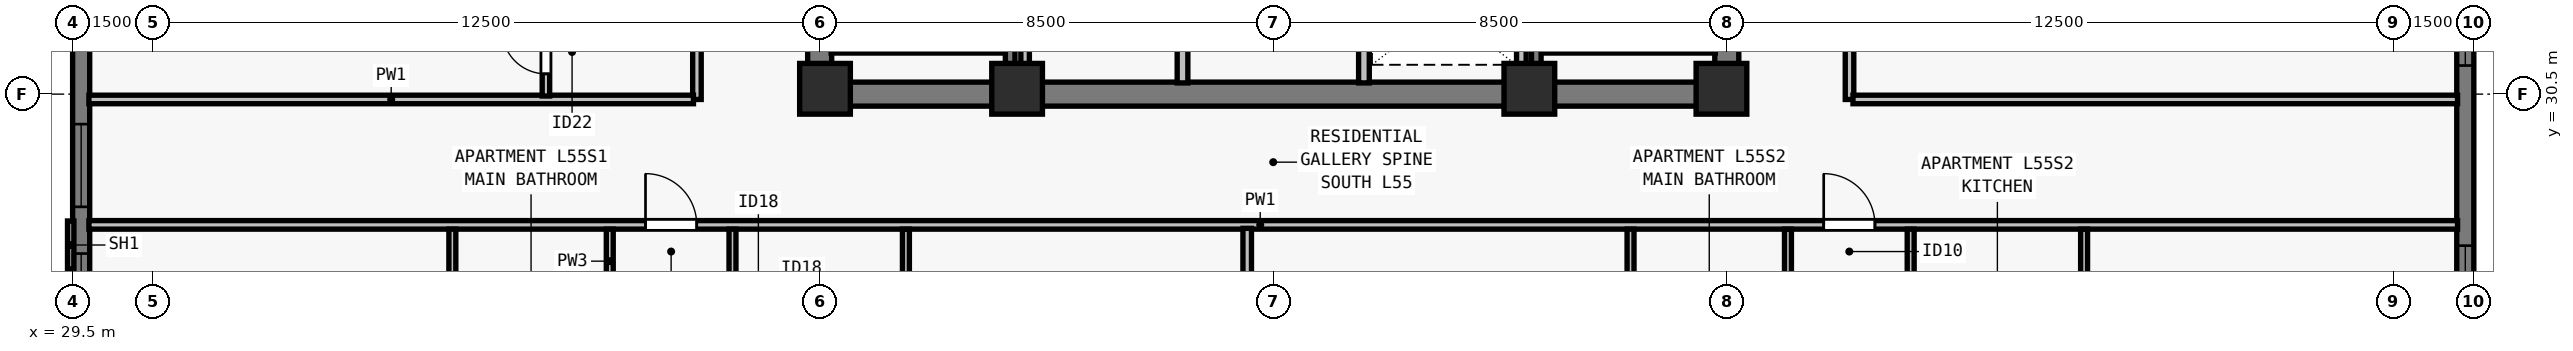
"""IFC4 building model, lengths in metres.
Left out: names, types, materials, properties, quantities, classifications, styles, units other than length and angle.
Written with IfcOpenShell. Run it as: python <this file> out.ifc"""

import sys

from ifc_helpers import new_model, si_unit, direction, frame, frame_2d, origin, origin_2d, place, context, subcontext, project, spatial, rectangle, extrude, element, fill, save


model = new_model("IFC4")
c1 = context("Model", 3, precision=1e-05, world=origin(), true_north=direction((0.0, 1.0)))
c2 = subcontext(c1, "Body", "Model", "MODEL_VIEW")
j1 = project(units=[si_unit("LENGTHUNIT", "METRE"), si_unit("PLANEANGLEUNIT", "RADIAN")], contexts=[c1])
p1 = place(None, origin())
s1 = spatial("IfcSite", under=j1, at=p1, CompositionType="ELEMENT")
p2 = place(p1, origin())
s2 = spatial("IfcBuilding", under=s1, at=p2, CompositionType="ELEMENT")
p3 = place(p2, frame((0.0, 0.0, 202.5)))
s3 = spatial("IfcBuildingStorey", under=s2, at=p3, CompositionType="ELEMENT", Elevation=202.5)
for number, where, z_axis, x_axis in (
    (1, (43.6, 30.6, 0.0), (0.0, 0.0, 1.0), (1.0, 0.0, 0.0)),
    (2, (47.2, 30.6, 0.0), (0.0, 0.0, 1.0), (1.0, 0.0, 0.0)),
    (3, (56.8, 30.6, 0.0), (0.0, 0.0, 1.0), (1.0, 0.0, 0.0)),
    (4, (60.4, 30.6, 0.0), (0.0, 0.0, 1.0), (1.0, 0.0, 0.0)),
):
    element("IfcColumn", number, at=place(p3, frame(where, z_axis=z_axis, x_axis=x_axis)), inside=s3, PredefinedType="COLUMN", context=c2, shape_type="SweptSolid", body=[
        extrude(rectangle(XDim=0.95, YDim=0.95, at=origin_2d()), origin(), (0.0, 0.0, 1.0), 3.5),
    ])
p4 = place(p3, frame((74.34, 56.5, 0.0), z_axis=(0.0, 0.0, 1.0), x_axis=(0.0, -1.0, 0.0)))
e5 = element("IfcWall", 5, at=p4, inside=s3, PredefinedType="SOLIDWALL", context=c2, shape_type="SweptSolid", body=[
    extrude(rectangle(XDim=34.702, YDim=0.32, at=frame_2d((17.351, 0.0))), origin(), (0.0, 0.0, 1.0), 3.29),
])
p5 = place(p4, frame((4.163, 0.0, 0.8)))
e6 = element("IfcOpeningElement", 6, at=p5, cuts=e5, PredefinedType="OPENING", context=c2, shape_type="SweptSolid", body=[
    extrude(rectangle(XDim=1.85, YDim=1.678, at=frame_2d((0.925, 0.839))), frame((0.0, 0.17, 0.0), z_axis=(0.0, -1.0, 0.0), x_axis=(1.0, 0.0, 0.0)), (0.0, 0.0, 1.0), 0.34),
])
p6 = place(p4, frame((6.888, 0.0, 0.8)))
e7 = element("IfcOpeningElement", 7, at=p6, cuts=e5, PredefinedType="OPENING", context=c2, shape_type="SweptSolid", body=[
    extrude(rectangle(XDim=1.55, YDim=1.678, at=frame_2d((0.775, 0.839))), frame((0.0, 0.17, 0.0), z_axis=(0.0, -1.0, 0.0), x_axis=(1.0, 0.0, 0.0)), (0.0, 0.0, 1.0), 0.34),
])
p7 = place(p4, frame((10.113, 0.0, 0.8)))
e8 = element("IfcOpeningElement", 8, at=p7, cuts=e5, PredefinedType="OPENING", context=c2, shape_type="SweptSolid", body=[
    extrude(rectangle(XDim=1.85, YDim=1.678, at=frame_2d((0.925, 0.839))), frame((0.0, 0.17, 0.0), z_axis=(0.0, -1.0, 0.0), x_axis=(1.0, 0.0, 0.0)), (0.0, 0.0, 1.0), 0.34),
])
p8 = place(p4, frame((14.888, 0.0, 0.8)))
e9 = element("IfcOpeningElement", 9, at=p8, cuts=e5, PredefinedType="OPENING", context=c2, shape_type="SweptSolid", body=[
    extrude(rectangle(XDim=1.55, YDim=1.678, at=frame_2d((0.775, 0.839))), frame((0.0, 0.17, 0.0), z_axis=(0.0, -1.0, 0.0), x_axis=(1.0, 0.0, 0.0)), (0.0, 0.0, 1.0), 0.34),
])
p9 = place(p4, frame((18.114, 0.0, 0.8)))
e10 = element("IfcOpeningElement", 10, at=p9, cuts=e5, PredefinedType="OPENING", context=c2, shape_type="SweptSolid", body=[
    extrude(rectangle(XDim=1.85, YDim=1.678, at=frame_2d((0.925, 0.839))), frame((0.0, 0.17, 0.0), z_axis=(0.0, -1.0, 0.0), x_axis=(1.0, 0.0, 0.0)), (0.0, 0.0, 1.0), 0.34),
])
p10 = place(p4, frame((23.614, 0.0, 0.8)))
e11 = element("IfcOpeningElement", 11, at=p10, cuts=e5, PredefinedType="OPENING", context=c2, shape_type="SweptSolid", body=[
    extrude(rectangle(XDim=1.85, YDim=1.678, at=frame_2d((0.925, 0.839))), frame((0.0, 0.17, 0.0), z_axis=(0.0, -1.0, 0.0), x_axis=(1.0, 0.0, 0.0)), (0.0, 0.0, 1.0), 0.34),
])
p11 = place(p4, frame((28.839, 0.0, 0.8)))
e12 = element("IfcOpeningElement", 12, at=p11, cuts=e5, PredefinedType="OPENING", context=c2, shape_type="SweptSolid", body=[
    extrude(rectangle(XDim=1.55, YDim=1.678, at=frame_2d((0.775, 0.839))), frame((0.0, 0.17, 0.0), z_axis=(0.0, -1.0, 0.0), x_axis=(1.0, 0.0, 0.0)), (0.0, 0.0, 1.0), 0.34),
])
p12 = place(p3, frame((29.66, 21.5, 0.0), z_axis=(0.0, 0.0, 1.0), x_axis=(0.0, 1.0, 0.0)))
e13 = element("IfcWall", 13, at=p12, inside=s3, PredefinedType="SOLIDWALL", context=c2, shape_type="SweptSolid", body=[
    extrude(rectangle(XDim=34.702, YDim=0.32, at=frame_2d((17.351, 0.0))), origin(), (0.0, 0.0, 1.0), 3.29),
])
p13 = place(p12, frame((4.163, 0.0, 0.8)))
e14 = element("IfcOpeningElement", 14, at=p13, cuts=e13, PredefinedType="OPENING", context=c2, shape_type="SweptSolid", body=[
    extrude(rectangle(XDim=1.85, YDim=1.678, at=frame_2d((0.925, 0.839))), frame((0.0, 0.17, 0.0), z_axis=(0.0, -1.0, 0.0), x_axis=(1.0, 0.0, 0.0)), (0.0, 0.0, 1.0), 0.34),
])
p14 = place(p12, frame((6.888, 0.0, 0.8)))
e15 = element("IfcOpeningElement", 15, at=p14, cuts=e13, PredefinedType="OPENING", context=c2, shape_type="SweptSolid", body=[
    extrude(rectangle(XDim=1.55, YDim=1.678, at=frame_2d((0.775, 0.839))), frame((0.0, 0.17, 0.0), z_axis=(0.0, -1.0, 0.0), x_axis=(1.0, 0.0, 0.0)), (0.0, 0.0, 1.0), 0.34),
])
p15 = place(p12, frame((10.113, 0.0, 0.8)))
e16 = element("IfcOpeningElement", 16, at=p15, cuts=e13, PredefinedType="OPENING", context=c2, shape_type="SweptSolid", body=[
    extrude(rectangle(XDim=1.85, YDim=1.678, at=frame_2d((0.925, 0.839))), frame((0.0, 0.17, 0.0), z_axis=(0.0, -1.0, 0.0), x_axis=(1.0, 0.0, 0.0)), (0.0, 0.0, 1.0), 0.34),
])
p16 = place(p12, frame((14.888, 0.0, 0.8)))
e17 = element("IfcOpeningElement", 17, at=p16, cuts=e13, PredefinedType="OPENING", context=c2, shape_type="SweptSolid", body=[
    extrude(rectangle(XDim=1.55, YDim=1.678, at=frame_2d((0.775, 0.839))), frame((0.0, 0.17, 0.0), z_axis=(0.0, -1.0, 0.0), x_axis=(1.0, 0.0, 0.0)), (0.0, 0.0, 1.0), 0.34),
])
p17 = place(p12, frame((19.364, 0.0, 0.8)))
e18 = element("IfcOpeningElement", 18, at=p17, cuts=e13, PredefinedType="OPENING", context=c2, shape_type="SweptSolid", body=[
    extrude(rectangle(XDim=1.85, YDim=1.678, at=frame_2d((0.925, 0.839))), frame((0.0, 0.17, 0.0), z_axis=(0.0, -1.0, 0.0), x_axis=(1.0, 0.0, 0.0)), (0.0, 0.0, 1.0), 0.34),
])
p18 = place(p12, frame((23.614, 0.0, 0.8)))
e19 = element("IfcOpeningElement", 19, at=p18, cuts=e13, PredefinedType="OPENING", context=c2, shape_type="SweptSolid", body=[
    extrude(rectangle(XDim=1.85, YDim=1.678, at=frame_2d((0.925, 0.839))), frame((0.0, 0.17, 0.0), z_axis=(0.0, -1.0, 0.0), x_axis=(1.0, 0.0, 0.0)), (0.0, 0.0, 1.0), 0.34),
])
p19 = place(p12, frame((28.839, 0.0, 0.8)))
e20 = element("IfcOpeningElement", 20, at=p19, cuts=e13, PredefinedType="OPENING", context=c2, shape_type="SweptSolid", body=[
    extrude(rectangle(XDim=1.55, YDim=1.678, at=frame_2d((0.775, 0.839))), frame((0.0, 0.17, 0.0), z_axis=(0.0, -1.0, 0.0), x_axis=(1.0, 0.0, 0.0)), (0.0, 0.0, 1.0), 0.34),
])
p20 = place(p3, frame((43.275, 30.5, 0.0), z_axis=(0.0, 0.0, 1.0), x_axis=(1.0, 0.0, 0.0)))
e21 = element("IfcWall", 21, at=p20, inside=s3, PredefinedType="SHEAR", context=c2, shape_type="SweptSolid", body=[
    extrude(rectangle(XDim=17.45, YDim=0.45, at=frame_2d((8.725, 0.0))), origin(), (0.0, 0.0, 1.0), 3.29),
])
for number, where, z_axis, x_axis in (
    (22, (43.5, 30.715, 0.0), (0.0, 0.0, 1.0), (0.0, 1.0, 0.0)),
    (23, (60.5, 30.715, 0.0), (0.0, 0.0, 1.0), (0.0, 1.0, 0.0)),
):
    element("IfcWall", number, at=place(p3, frame(where, z_axis=z_axis, x_axis=x_axis)), inside=s3, PredefinedType="SHEAR", context=c2, shape_type="SweptSolid", body=[
        extrude(rectangle(XDim=8.035, YDim=0.45, at=frame_2d((4.018, 0.0))), origin(), (0.0, 0.0, 1.0), 3.29),
    ])
p21 = place(p3, frame((50.3, 30.71, 0.0), z_axis=(0.0, 0.0, 1.0), x_axis=(0.0, 1.0, 0.0)))
e24 = element("IfcWall", 24, at=p21, inside=s3, PredefinedType="SOLIDWALL", context=c2, shape_type="SweptSolid", body=[
    extrude(rectangle(XDim=7.905, YDim=0.2, at=frame_2d((3.953, 0.0))), origin(), (0.0, 0.0, 1.0), 3.29),
])
p22 = place(p21, frame((3.34, 0.0, 0.0)))
e25 = element("IfcOpeningElement", 25, at=p22, cuts=e24, PredefinedType="OPENING", context=c2, shape_type="SweptSolid", body=[
    extrude(rectangle(XDim=0.9, YDim=2.12, at=frame_2d((0.45, 1.06))), frame((0.0, 0.11, 0.0), z_axis=(0.0, -1.0, 0.0), x_axis=(1.0, 0.0, 0.0)), (0.0, 0.0, 1.0), 0.22),
])
p23 = place(p3, frame((53.7, 30.71, 0.0), z_axis=(0.0, 0.0, 1.0), x_axis=(0.0, 1.0, 0.0)))
e26 = element("IfcWall", 26, at=p23, inside=s3, PredefinedType="SOLIDWALL", context=c2, shape_type="SweptSolid", body=[
    extrude(rectangle(XDim=7.905, YDim=0.2, at=frame_2d((3.953, 0.0))), origin(), (0.0, 0.0, 1.0), 3.29),
])
p24 = place(p3, frame((47.35, 30.71, 0.0), z_axis=(0.0, 0.0, 1.0), x_axis=(0.0, 1.0, 0.0)))
e27 = element("IfcWall", 27, at=p24, inside=s3, PredefinedType="PARTITIONING", context=c2, shape_type="SweptSolid", body=[
    extrude(rectangle(XDim=7.905, YDim=0.16, at=frame_2d((3.953, 0.0))), origin(), (0.0, 0.0, 1.0), 3.29),
])
p25 = place(p3, frame((56.65, 30.71, 0.0), z_axis=(0.0, 0.0, 1.0), x_axis=(0.0, 1.0, 0.0)))
e28 = element("IfcWall", 28, at=p25, inside=s3, PredefinedType="SOLIDWALL", context=c2, shape_type="SweptSolid", body=[
    extrude(rectangle(XDim=7.905, YDim=0.18, at=frame_2d((3.953, 0.0))), origin(), (0.0, 0.0, 1.0), 3.29),
])
p26 = place(p3, frame((29.805, 28.05, 0.0), z_axis=(0.0, 0.0, 1.0), x_axis=(1.0, 0.0, 0.0)))
e29 = element("IfcWall", 29, at=p26, inside=s3, PredefinedType="PARTITIONING", context=c2, shape_type="SweptSolid", body=[
    extrude(rectangle(XDim=44.39, YDim=0.16, at=frame_2d((22.195, 0.0))), origin(), (0.0, 0.0, 1.0), 2.958),
])
p27 = place(p26, frame((10.431, 0.0, 0.0)))
e30 = element("IfcOpeningElement", 30, at=p27, cuts=e29, PredefinedType="OPENING", context=c2, shape_type="SweptSolid", body=[
    extrude(rectangle(XDim=0.96, YDim=2.18, at=frame_2d((0.48, 1.09))), frame((0.0, 0.09, 0.0), z_axis=(0.0, -1.0, 0.0), x_axis=(1.0, 0.0, 0.0)), (0.0, 0.0, 1.0), 0.18),
])
p28 = place(p26, frame((32.511, 0.0, 0.0)))
e31 = element("IfcOpeningElement", 31, at=p28, cuts=e29, PredefinedType="OPENING", context=c2, shape_type="SweptSolid", body=[
    extrude(rectangle(XDim=0.96, YDim=2.18, at=frame_2d((0.48, 1.09))), frame((0.0, 0.09, 0.0), z_axis=(0.0, -1.0, 0.0), x_axis=(1.0, 0.0, 0.0)), (0.0, 0.0, 1.0), 0.18),
])
p29 = place(p3, frame((41.2, 30.4, 0.0), z_axis=(0.0, 0.0, 1.0), x_axis=(0.0, 1.0, 0.0)))
e32 = element("IfcWall", 32, at=p29, inside=s3, PredefinedType="PARTITIONING", context=c2, shape_type="SweptSolid", body=[
    extrude(rectangle(XDim=17.2, YDim=0.16, at=frame_2d((8.6, 0.0))), origin(), (0.0, 0.0, 1.0), 3.29),
])
p30 = place(p29, frame((8.12, 0.0, 0.0)))
e33 = element("IfcOpeningElement", 33, at=p30, cuts=e32, PredefinedType="OPENING", context=c2, shape_type="SweptSolid", body=[
    extrude(rectangle(XDim=0.96, YDim=2.18, at=frame_2d((0.48, 1.09))), frame((0.0, 0.09, 0.0), z_axis=(0.0, -1.0, 0.0), x_axis=(1.0, 0.0, 0.0)), (0.0, 0.0, 1.0), 0.18),
])
p31 = place(p3, frame((62.8, 30.4, 0.0), z_axis=(0.0, 0.0, 1.0), x_axis=(0.0, 1.0, 0.0)))
e34 = element("IfcWall", 34, at=p31, inside=s3, PredefinedType="PARTITIONING", context=c2, shape_type="SweptSolid", body=[
    extrude(rectangle(XDim=17.2, YDim=0.16, at=frame_2d((8.6, 0.0))), origin(), (0.0, 0.0, 1.0), 3.29),
])
p32 = place(p31, frame((3.6, 0.0, 0.0)))
e35 = element("IfcOpeningElement", 35, at=p32, cuts=e34, PredefinedType="OPENING", context=c2, shape_type="SweptSolid", body=[
    extrude(rectangle(XDim=0.96, YDim=2.12, at=frame_2d((0.48, 1.06))), frame((0.0, 0.09, 0.0), z_axis=(0.0, -1.0, 0.0), x_axis=(1.0, 0.0, 0.0)), (0.0, 0.0, 1.0), 0.18),
])
p33 = place(p31, frame((12.44, 0.0, 0.0)))
e36 = element("IfcOpeningElement", 36, at=p33, cuts=e34, PredefinedType="OPENING", context=c2, shape_type="SweptSolid", body=[
    extrude(rectangle(XDim=0.96, YDim=2.18, at=frame_2d((0.48, 1.09))), frame((0.0, 0.09, 0.0), z_axis=(0.0, -1.0, 0.0), x_axis=(1.0, 0.0, 0.0)), (0.0, 0.0, 1.0), 0.18),
])
for number, where, z_axis, x_axis in (
    (37, (29.805, 30.4, 0.0), (0.0, 0.0, 1.0), (1.0, 0.0, 0.0)),
    (38, (62.865, 30.4, 0.0), (0.0, 0.0, 1.0), (1.0, 0.0, 0.0)),
):
    element("IfcWall", number, at=place(p3, frame(where, z_axis=z_axis, x_axis=x_axis)), inside=s3, PredefinedType="PARTITIONING", context=c2, shape_type="SweptSolid", body=[
        extrude(rectangle(XDim=11.33, YDim=0.16, at=frame_2d((5.665, 0.0))), origin(), (0.0, 0.0, 1.0), 3.29),
    ])
p34 = place(p3, frame((36.616, 25.22, 0.0), z_axis=(0.0, 0.0, 1.0), x_axis=(0.0, 1.0, 0.0)))
e39 = element("IfcWall", 39, at=p34, inside=s3, PredefinedType="PLUMBINGWALL", context=c2, shape_type="SweptSolid", body=[
    extrude(rectangle(XDim=2.75, YDim=0.13, at=frame_2d((1.375, 0.0))), origin(), (0.0, 0.0, 1.0), 3.29),
])
p35 = place(p3, frame((39.566, 25.22, 0.0), z_axis=(0.0, 0.0, 1.0), x_axis=(0.0, 1.0, 0.0)))
e40 = element("IfcWall", 40, at=p35, inside=s3, PredefinedType="PLUMBINGWALL", context=c2, shape_type="SweptSolid", body=[
    extrude(rectangle(XDim=2.75, YDim=0.13, at=frame_2d((1.375, 0.0))), origin(), (0.0, 0.0, 1.0), 3.29),
])
p36 = place(p35, frame((0.55, 0.0, 0.0)))
e41 = element("IfcOpeningElement", 41, at=p36, cuts=e40, PredefinedType="OPENING", context=c2, shape_type="SweptSolid", body=[
    extrude(rectangle(XDim=0.85, YDim=2.08, at=frame_2d((0.425, 1.04))), frame((0.0, 0.075, 0.0), z_axis=(0.0, -1.0, 0.0), x_axis=(1.0, 0.0, 0.0)), (0.0, 0.0, 1.0), 0.15),
])
p37 = place(p3, frame((45.116, 25.22, 0.0), z_axis=(0.0, 0.0, 1.0), x_axis=(0.0, 1.0, 0.0)))
e42 = element("IfcWall", 42, at=p37, inside=s3, PredefinedType="PLUMBINGWALL", context=c2, shape_type="SweptSolid", body=[
    extrude(rectangle(XDim=2.75, YDim=0.13, at=frame_2d((1.375, 0.0))), origin(), (0.0, 0.0, 1.0), 3.29),
])
p38 = place(p3, frame((41.866, 25.22, 0.0), z_axis=(0.0, 0.0, 1.0), x_axis=(0.0, 1.0, 0.0)))
e43 = element("IfcWall", 43, at=p38, inside=s3, PredefinedType="PLUMBINGWALL", context=c2, shape_type="SweptSolid", body=[
    extrude(rectangle(XDim=2.75, YDim=0.13, at=frame_2d((1.375, 0.0))), origin(), (0.0, 0.0, 1.0), 2.573),
])
p39 = place(p38, frame((0.55, 0.0, 0.0)))
e44 = element("IfcOpeningElement", 44, at=p39, cuts=e43, PredefinedType="OPENING", context=c2, shape_type="SweptSolid", body=[
    extrude(rectangle(XDim=0.88, YDim=2.1, at=frame_2d((0.44, 1.05))), frame((0.0, 0.075, 0.0), z_axis=(0.0, -1.0, 0.0), x_axis=(1.0, 0.0, 0.0)), (0.0, 0.0, 1.0), 0.15),
])
p40 = place(p3, frame((51.512, 16.805, 0.0), z_axis=(0.0, 0.0, 1.0), x_axis=(0.0, 1.0, 0.0)))
e45 = element("IfcWall", 45, at=p40, inside=s3, PredefinedType="PARTITIONING", context=c2, shape_type="SweptSolid", body=[
    extrude(rectangle(XDim=11.18, YDim=0.16, at=frame_2d((5.59, 0.0))), origin(), (0.0, 0.0, 1.0), 2.958),
])
p41 = place(p3, frame((58.696, 25.22, 0.0), z_axis=(0.0, 0.0, 1.0), x_axis=(0.0, 1.0, 0.0)))
e46 = element("IfcWall", 46, at=p41, inside=s3, PredefinedType="PLUMBINGWALL", context=c2, shape_type="SweptSolid", body=[
    extrude(rectangle(XDim=2.75, YDim=0.13, at=frame_2d((1.375, 0.0))), origin(), (0.0, 0.0, 1.0), 3.29),
])
p42 = place(p3, frame((61.646, 25.22, 0.0), z_axis=(0.0, 0.0, 1.0), x_axis=(0.0, 1.0, 0.0)))
e47 = element("IfcWall", 47, at=p42, inside=s3, PredefinedType="PLUMBINGWALL", context=c2, shape_type="SweptSolid", body=[
    extrude(rectangle(XDim=2.75, YDim=0.13, at=frame_2d((1.375, 0.0))), origin(), (0.0, 0.0, 1.0), 3.29),
])
p43 = place(p42, frame((0.55, 0.0, 0.0)))
e48 = element("IfcOpeningElement", 48, at=p43, cuts=e47, PredefinedType="OPENING", context=c2, shape_type="SweptSolid", body=[
    extrude(rectangle(XDim=0.85, YDim=2.08, at=frame_2d((0.425, 1.04))), frame((0.0, 0.075, 0.0), z_axis=(0.0, -1.0, 0.0), x_axis=(1.0, 0.0, 0.0)), (0.0, 0.0, 1.0), 0.15),
])
p44 = place(p3, frame((67.196, 25.22, 0.0), z_axis=(0.0, 0.0, 1.0), x_axis=(0.0, 1.0, 0.0)))
e49 = element("IfcWall", 49, at=p44, inside=s3, PredefinedType="PLUMBINGWALL", context=c2, shape_type="SweptSolid", body=[
    extrude(rectangle(XDim=2.75, YDim=0.13, at=frame_2d((1.375, 0.0))), origin(), (0.0, 0.0, 1.0), 3.29),
])
p45 = place(p3, frame((63.946, 25.22, 0.0), z_axis=(0.0, 0.0, 1.0), x_axis=(0.0, 1.0, 0.0)))
e50 = element("IfcWall", 50, at=p45, inside=s3, PredefinedType="PLUMBINGWALL", context=c2, shape_type="SweptSolid", body=[
    extrude(rectangle(XDim=2.75, YDim=0.13, at=frame_2d((1.375, 0.0))), origin(), (0.0, 0.0, 1.0), 2.573),
])
p46 = place(p45, frame((0.55, 0.0, 0.0)))
e51 = element("IfcOpeningElement", 51, at=p46, cuts=e50, PredefinedType="OPENING", context=c2, shape_type="SweptSolid", body=[
    extrude(rectangle(XDim=0.88, YDim=2.1, at=frame_2d((0.44, 1.05))), frame((0.0, 0.075, 0.0), z_axis=(0.0, -1.0, 0.0), x_axis=(1.0, 0.0, 0.0)), (0.0, 0.0, 1.0), 0.15),
])
p47 = place(p3, frame((38.37, 30.465, 0.0), z_axis=(0.0, 0.0, 1.0), x_axis=(0.0, 1.0, 0.0)))
e52 = element("IfcWall", 52, at=p47, inside=s3, PredefinedType="PARTITIONING", context=c2, shape_type="SweptSolid", body=[
    extrude(rectangle(XDim=4.16, YDim=0.14, at=frame_2d((2.08, 0.0))), origin(), (0.0, 0.0, 1.0), 3.29),
])
p48 = place(p47, frame((0.415, 0.0, 0.0)))
e53 = element("IfcOpeningElement", 53, at=p48, cuts=e52, PredefinedType="OPENING", context=c2, shape_type="SweptSolid", body=[
    extrude(rectangle(XDim=0.82, YDim=2.1, at=frame_2d((0.41, 1.05))), frame((0.0, 0.08, 0.0), z_axis=(0.0, -1.0, 0.0), x_axis=(1.0, 0.0, 0.0)), (0.0, 0.0, 1.0), 0.16),
])
p49 = place(p3, frame((43.715, 31.36, 0.0), z_axis=(0.0, 0.0, 1.0), x_axis=(1.0, 0.0, 0.0)))
e54 = element("IfcWall", 54, at=p49, inside=s3, PredefinedType="SOLIDWALL", context=c2, shape_type="SweptSolid", body=[
    extrude(rectangle(XDim=3.28, YDim=0.18, at=frame_2d((1.64, 0.0))), origin(), (0.0, 0.0, 1.0), 3.29),
])
p50 = place(p3, frame((47.07, 38.78, 0.0), z_axis=(0.0, 0.0, 1.0), x_axis=(0.0, -1.0, 0.0)))
e55 = element("IfcWall", 55, at=p50, inside=s3, PredefinedType="SOLIDWALL", context=c2, shape_type="SweptSolid", body=[
    extrude(rectangle(XDim=8.067, YDim=0.18, at=frame_2d((4.034, 0.0))), origin(), (0.0, 0.0, 1.0), 3.29),
])
p51 = place(p3, frame((57.005, 31.36, 0.0), z_axis=(0.0, 0.0, 1.0), x_axis=(1.0, 0.0, 0.0)))
e56 = element("IfcWall", 56, at=p51, inside=s3, PredefinedType="SOLIDWALL", context=c2, shape_type="SweptSolid", body=[
    extrude(rectangle(XDim=3.28, YDim=0.18, at=frame_2d((1.64, 0.0))), origin(), (0.0, 0.0, 1.0), 3.29),
])
p52 = place(p3, frame((56.93, 38.78, 0.0), z_axis=(0.0, 0.0, 1.0), x_axis=(0.0, -1.0, 0.0)))
e57 = element("IfcWall", 57, at=p52, inside=s3, PredefinedType="SOLIDWALL", context=c2, shape_type="SweptSolid", body=[
    extrude(rectangle(XDim=8.067, YDim=0.18, at=frame_2d((4.034, 0.0))), origin(), (0.0, 0.0, 1.0), 3.29),
])
p53 = place(p10, origin())
e58 = element("IfcWindow", 58, at=p53, inside=s3, PartitioningType="SINGLE_PANEL", PredefinedType="WINDOW", context=c2, shape_type="SweptSolid", body=[
    extrude(rectangle(XDim=1.85, YDim=1.678, at=frame_2d((0.925, 0.839))), frame((0.0, -0.05, 0.0), z_axis=(0.0, -1.0, 0.0), x_axis=(1.0, 0.0, 0.0)), (0.0, 0.0, 1.0), 0.06),
])
fill(e11, e58)
p54 = place(p11, origin())
e59 = element("IfcWindow", 59, at=p54, inside=s3, PartitioningType="SINGLE_PANEL", PredefinedType="WINDOW", context=c2, shape_type="SweptSolid", body=[
    extrude(rectangle(XDim=1.55, YDim=1.678, at=frame_2d((0.775, 0.839))), frame((0.0, -0.05, 0.0), z_axis=(0.0, -1.0, 0.0), x_axis=(1.0, 0.0, 0.0)), (0.0, 0.0, 1.0), 0.06),
])
fill(e12, e59)
p55 = place(p13, origin())
e60 = element("IfcWindow", 60, at=p55, inside=s3, PartitioningType="SINGLE_PANEL", PredefinedType="WINDOW", context=c2, shape_type="SweptSolid", body=[
    extrude(rectangle(XDim=1.85, YDim=1.678, at=frame_2d((0.925, 0.839))), frame((0.0, -0.05, 0.0), z_axis=(0.0, -1.0, 0.0), x_axis=(1.0, 0.0, 0.0)), (0.0, 0.0, 1.0), 0.06),
])
fill(e14, e60)
p56 = place(p14, origin())
e61 = element("IfcWindow", 61, at=p56, inside=s3, PartitioningType="SINGLE_PANEL", PredefinedType="WINDOW", context=c2, shape_type="SweptSolid", body=[
    extrude(rectangle(XDim=1.55, YDim=1.678, at=frame_2d((0.775, 0.839))), frame((0.0, -0.05, 0.0), z_axis=(0.0, -1.0, 0.0), x_axis=(1.0, 0.0, 0.0)), (0.0, 0.0, 1.0), 0.06),
])
fill(e15, e61)
p57 = place(p27, origin())
e62 = element("IfcDoor", 62, at=p57, inside=s3, OperationType="SINGLE_SWING_LEFT", PredefinedType="DOOR", context=c2, shape_type="SweptSolid", body=[
    extrude(rectangle(XDim=0.96, YDim=2.18, at=frame_2d((0.48, 1.09))), frame((0.0, 0.025, 0.0), z_axis=(0.0, -1.0, 0.0), x_axis=(1.0, 0.0, 0.0)), (0.0, 0.0, 1.0), 0.05),
])
fill(e30, e62)
p58 = place(p28, origin())
e63 = element("IfcDoor", 63, at=p58, inside=s3, OperationType="SINGLE_SWING_LEFT", PredefinedType="DOOR", context=c2, shape_type="SweptSolid", body=[
    extrude(rectangle(XDim=0.96, YDim=2.18, at=frame_2d((0.48, 1.09))), frame((0.0, 0.025, 0.0), z_axis=(0.0, -1.0, 0.0), x_axis=(1.0, 0.0, 0.0)), (0.0, 0.0, 1.0), 0.05),
])
fill(e31, e63)
p59 = place(p48, origin())
e64 = element("IfcDoor", 64, at=p59, inside=s3, OperationType="SINGLE_SWING_RIGHT", PredefinedType="DOOR", context=c2, shape_type="SweptSolid", body=[
    extrude(rectangle(XDim=0.82, YDim=2.1, at=frame_2d((0.41, 1.05))), frame((0.0, 0.025, 0.0), z_axis=(0.0, -1.0, 0.0), x_axis=(1.0, 0.0, 0.0)), (0.0, 0.0, 1.0), 0.05),
])
fill(e53, e64)
save(model, sys.argv[1])
